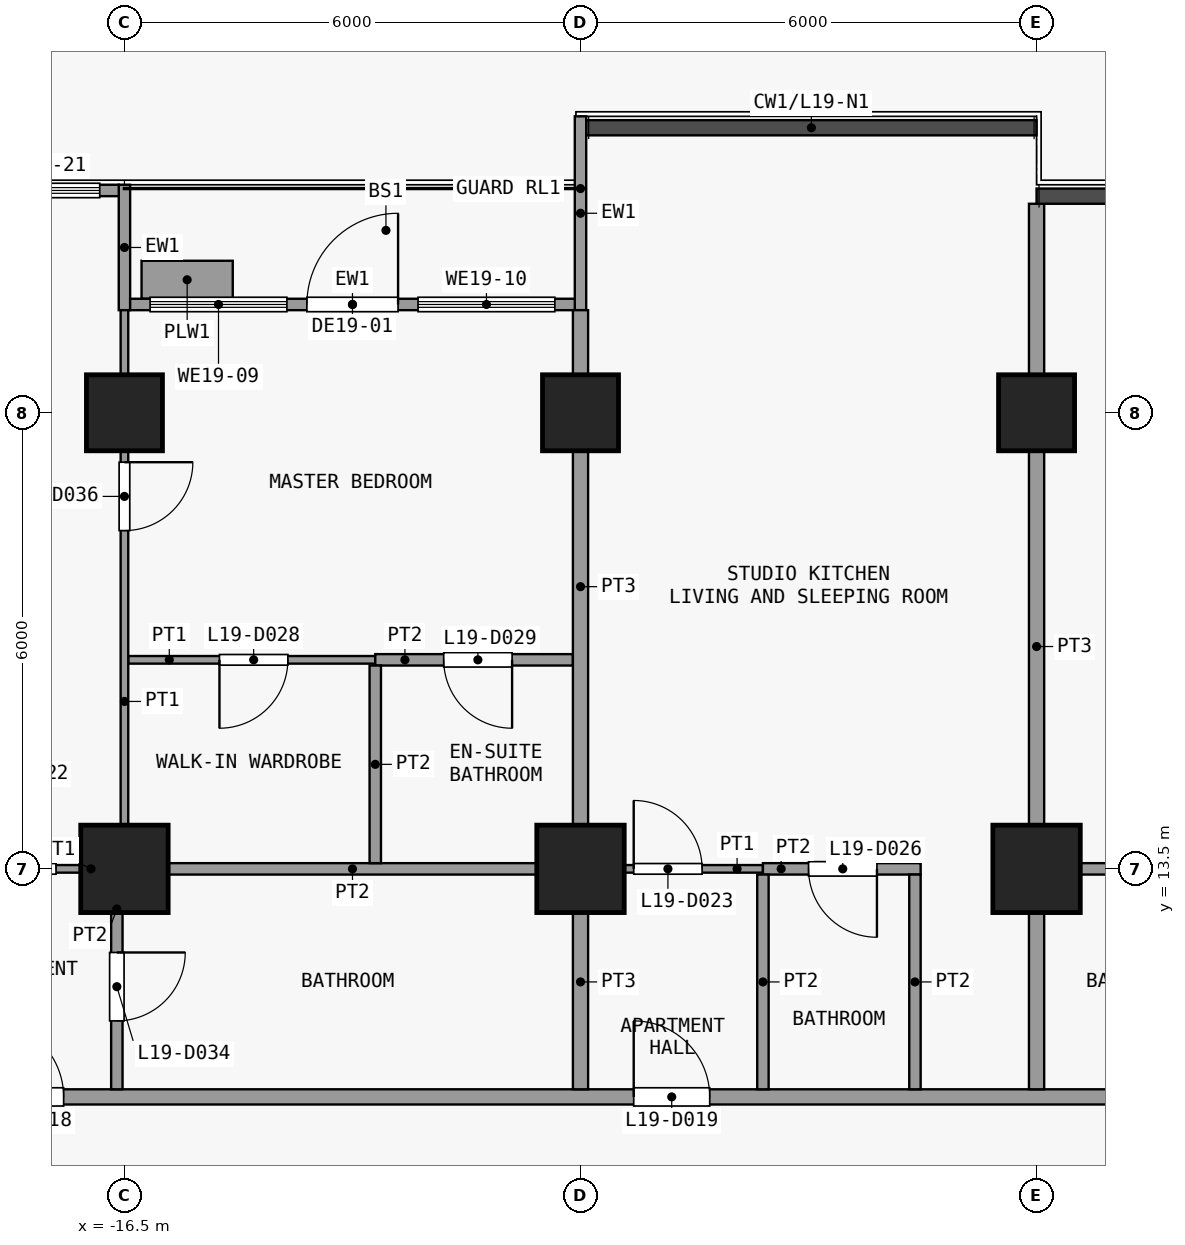
"""IFC4 building model, lengths in metres.
Left out: names, types, materials, properties, quantities, classifications, styles, units other than length and angle.
Written with IfcOpenShell. Run it as: python <this file> out.ifc"""

import sys

from ifc_helpers import new_model, si_unit, direction, frame, frame_2d, origin, origin_2d, place, context, subcontext, project, spatial, rectangle, extrude, element, fill, save


model = new_model("IFC4")
c1 = context("Model", 3, precision=1e-05, world=origin(), true_north=direction((0.0, 1.0)))
c2 = subcontext(c1, "Body", "Model", "MODEL_VIEW")
j1 = project(units=[si_unit("LENGTHUNIT", "METRE"), si_unit("PLANEANGLEUNIT", "RADIAN")], contexts=[c1])
p1 = place(None, origin())
s1 = spatial("IfcSite", under=j1, at=p1, CompositionType="ELEMENT")
p2 = place(p1, origin())
s2 = spatial("IfcBuilding", under=s1, at=p2, CompositionType="ELEMENT")
p3 = place(p2, frame((0.0, 0.0, 81.1)))
s3 = spatial("IfcBuildingStorey", under=s2, at=p3, CompositionType="ELEMENT", Elevation=81.1)
p4 = place(p3, frame((-16.5, 13.5, 0.0), z_axis=(0.0, 0.0, 1.0), x_axis=(1.0, 0.0, 0.0)))
e1 = element("IfcColumn", 1, at=p4, inside=s3, PredefinedType="COLUMN", context=c2, shape_type="SweptSolid", body=[
    extrude(rectangle(XDim=1.15, YDim=1.15, at=origin_2d()), origin(), (0.0, 0.0, 1.0), 3.6),
])
p5 = place(p3, frame((-16.5, 19.5, 0.0), z_axis=(0.0, 0.0, 1.0), x_axis=(1.0, 0.0, 0.0)))
e2 = element("IfcColumn", 2, at=p5, inside=s3, PredefinedType="COLUMN", context=c2, shape_type="SweptSolid", body=[
    extrude(rectangle(XDim=1.0, YDim=1.0, at=origin_2d()), origin(), (0.0, 0.0, 1.0), 3.6),
])
p6 = place(p3, frame((-10.5, 13.5, 0.0), z_axis=(0.0, 0.0, 1.0), x_axis=(1.0, 0.0, 0.0)))
e3 = element("IfcColumn", 3, at=p6, inside=s3, PredefinedType="COLUMN", context=c2, shape_type="SweptSolid", body=[
    extrude(rectangle(XDim=1.15, YDim=1.15, at=origin_2d()), origin(), (0.0, 0.0, 1.0), 3.6),
])
p7 = place(p3, frame((-10.5, 19.5, 0.0), z_axis=(0.0, 0.0, 1.0), x_axis=(1.0, 0.0, 0.0)))
e4 = element("IfcColumn", 4, at=p7, inside=s3, PredefinedType="COLUMN", context=c2, shape_type="SweptSolid", body=[
    extrude(rectangle(XDim=1.0, YDim=1.0, at=origin_2d()), origin(), (0.0, 0.0, 1.0), 3.6),
])
p8 = place(p3, frame((-4.5, 13.5, 0.0), z_axis=(0.0, 0.0, 1.0), x_axis=(1.0, 0.0, 0.0)))
e5 = element("IfcColumn", 5, at=p8, inside=s3, PredefinedType="COLUMN", context=c2, shape_type="SweptSolid", body=[
    extrude(rectangle(XDim=1.15, YDim=1.15, at=origin_2d()), origin(), (0.0, 0.0, 1.0), 3.6),
])
p9 = place(p3, frame((-4.5, 19.5, 0.0), z_axis=(0.0, 0.0, 1.0), x_axis=(1.0, 0.0, 0.0)))
e6 = element("IfcColumn", 6, at=p9, inside=s3, PredefinedType="COLUMN", context=c2, shape_type="SweptSolid", body=[
    extrude(rectangle(XDim=1.0, YDim=1.0, at=origin_2d()), origin(), (0.0, 0.0, 1.0), 3.6),
])
p10 = place(p3, frame((-16.5, 20.85, 0.0), z_axis=(0.0, 0.0, 1.0), x_axis=(0.0, 1.0, 0.0)))
e7 = element("IfcWall", 7, at=p10, inside=s3, PredefinedType="SOLIDWALL", context=c2, shape_type="SweptSolid", body=[
    extrude(rectangle(XDim=1.65, YDim=0.15, at=frame_2d((0.825, 0.0))), origin(), (0.0, 0.0, 1.0), 3.3),
])
p11 = place(p3, frame((-10.5, 20.85, 0.0), z_axis=(0.0, 0.0, 1.0), x_axis=(0.0, 1.0, 0.0)))
e8 = element("IfcWall", 8, at=p11, inside=s3, PredefinedType="SOLIDWALL", context=c2, shape_type="SweptSolid", body=[
    extrude(rectangle(XDim=2.55, YDim=0.15, at=frame_2d((1.275, 0.0))), origin(), (0.0, 0.0, 1.0), 3.3),
])
p12 = place(p3, frame((-16.425, 20.925, 0.0), z_axis=(0.0, 0.0, 1.0), x_axis=(1.0, 0.0, 0.0)))
e9 = element("IfcWall", 9, at=p12, inside=s3, PredefinedType="SOLIDWALL", context=c2, shape_type="SweptSolid", body=[
    extrude(rectangle(XDim=5.85, YDim=0.15, at=frame_2d((2.925, 0.0))), origin(), (0.0, 0.0, 1.0), 3.3),
])
p13 = place(p12, frame((2.325, 0.0, 0.0)))
e10 = element("IfcOpeningElement", 10, at=p13, cuts=e9, PredefinedType="OPENING", context=c2, shape_type="SweptSolid", body=[
    extrude(rectangle(XDim=1.2, YDim=2.4, at=frame_2d((0.6, 1.2))), frame((0.0, 0.085, 0.0), z_axis=(0.0, -1.0, 0.0), x_axis=(1.0, 0.0, 0.0)), (0.0, 0.0, 1.0), 0.17),
])
p14 = place(p12, frame((0.262, 0.0, 0.9)))
e11 = element("IfcOpeningElement", 11, at=p14, cuts=e9, PredefinedType="OPENING", context=c2, shape_type="SweptSolid", body=[
    extrude(rectangle(XDim=1.8, YDim=2.1, at=frame_2d((0.9, 1.05))), frame((0.0, 0.085, 0.0), z_axis=(0.0, -1.0, 0.0), x_axis=(1.0, 0.0, 0.0)), (0.0, 0.0, 1.0), 0.17),
])
p15 = place(p12, frame((3.788, 0.0, 0.9)))
e12 = element("IfcOpeningElement", 12, at=p15, cuts=e9, PredefinedType="OPENING", context=c2, shape_type="SweptSolid", body=[
    extrude(rectangle(XDim=1.8, YDim=2.1, at=frame_2d((0.9, 1.05))), frame((0.0, 0.085, 0.0), z_axis=(0.0, -1.0, 0.0), x_axis=(1.0, 0.0, 0.0)), (0.0, 0.0, 1.0), 0.17),
])
p16 = place(p3, frame((-16.275, 21.25, 0.0), z_axis=(0.0, 0.0, 1.0), x_axis=(1.0, 0.0, 0.0)))
e13 = element("IfcWall", 13, at=p16, inside=s3, PredefinedType="USERDEFINED", context=c2, shape_type="SweptSolid", body=[
    extrude(rectangle(XDim=1.2, YDim=0.5, at=frame_2d((0.6, 0.0))), origin(), (0.0, 0.0, 1.0), 0.9),
])
p17 = place(p3, frame((-22.0, 22.425, 0.0), z_axis=(0.0, 0.0, 1.0), x_axis=(1.0, 0.0, 0.0)))
e14 = element("IfcWall", 14, at=p17, inside=s3, PredefinedType="SOLIDWALL", context=c2, shape_type="SweptSolid", body=[
    extrude(rectangle(XDim=5.425, YDim=0.15, at=frame_2d((2.712, 0.0))), origin(), (0.0, 0.0, 1.0), 3.3),
])
p18 = place(p17, frame((2.0, 0.0, 0.0)))
e15 = element("IfcOpeningElement", 15, at=p18, cuts=e14, PredefinedType="OPENING", context=c2, shape_type="SweptSolid", body=[
    extrude(rectangle(XDim=1.5, YDim=2.4, at=frame_2d((0.75, 1.2))), frame((0.0, 0.085, 0.0), z_axis=(0.0, -1.0, 0.0), x_axis=(1.0, 0.0, 0.0)), (0.0, 0.0, 1.0), 0.17),
])
p19 = place(p17, frame((0.25, 0.0, 0.9)))
e16 = element("IfcOpeningElement", 16, at=p19, cuts=e14, PredefinedType="OPENING", context=c2, shape_type="SweptSolid", body=[
    extrude(rectangle(XDim=1.5, YDim=2.1, at=frame_2d((0.75, 1.05))), frame((0.0, 0.085, 0.0), z_axis=(0.0, -1.0, 0.0), x_axis=(1.0, 0.0, 0.0)), (0.0, 0.0, 1.0), 0.17),
])
p20 = place(p17, frame((3.75, 0.0, 0.9)))
e17 = element("IfcOpeningElement", 17, at=p20, cuts=e14, PredefinedType="OPENING", context=c2, shape_type="SweptSolid", body=[
    extrude(rectangle(XDim=1.425, YDim=2.1, at=frame_2d((0.712, 1.05))), frame((0.0, 0.085, 0.0), z_axis=(0.0, -1.0, 0.0), x_axis=(1.0, 0.0, 0.0)), (0.0, 0.0, 1.0), 0.17),
])
p21 = place(p3, frame((-23.85, 10.5, 0.0), z_axis=(0.0, 0.0, 1.0), x_axis=(1.0, 0.0, 0.0)))
e18 = element("IfcWall", 18, at=p21, inside=s3, PredefinedType="PARTITIONING", context=c2, shape_type="SweptSolid", body=[
    extrude(rectangle(XDim=49.2, YDim=0.2, at=frame_2d((24.6, 0.0))), origin(), (0.0, 0.0, 1.0), 3.3),
])
p22 = place(p21, frame((5.55, 0.0, 0.0)))
e19 = element("IfcOpeningElement", 19, at=p22, cuts=e18, PredefinedType="OPENING", context=c2, shape_type="SweptSolid", body=[
    extrude(rectangle(XDim=1.0, YDim=2.1, at=frame_2d((0.5, 1.05))), frame((0.0, 0.11, 0.0), z_axis=(0.0, -1.0, 0.0), x_axis=(1.0, 0.0, 0.0)), (0.0, 0.0, 1.0), 0.22),
])
p23 = place(p21, frame((14.05, 0.0, 0.0)))
e20 = element("IfcOpeningElement", 20, at=p23, cuts=e18, PredefinedType="OPENING", context=c2, shape_type="SweptSolid", body=[
    extrude(rectangle(XDim=1.0, YDim=2.1, at=frame_2d((0.5, 1.05))), frame((0.0, 0.11, 0.0), z_axis=(0.0, -1.0, 0.0), x_axis=(1.0, 0.0, 0.0)), (0.0, 0.0, 1.0), 0.22),
])
p24 = place(p21, frame((22.55, 0.0, 0.0)))
e21 = element("IfcOpeningElement", 21, at=p24, cuts=e18, PredefinedType="OPENING", context=c2, shape_type="SweptSolid", body=[
    extrude(rectangle(XDim=1.0, YDim=2.1, at=frame_2d((0.5, 1.05))), frame((0.0, 0.11, 0.0), z_axis=(0.0, -1.0, 0.0), x_axis=(1.0, 0.0, 0.0)), (0.0, 0.0, 1.0), 0.22),
])
p25 = place(p21, frame((43.55, 0.0, 0.0)))
e22 = element("IfcOpeningElement", 22, at=p25, cuts=e18, PredefinedType="OPENING", context=c2, shape_type="SweptSolid", body=[
    extrude(rectangle(XDim=1.0, YDim=2.1, at=frame_2d((0.5, 1.05))), frame((0.0, 0.11, 0.0), z_axis=(0.0, -1.0, 0.0), x_axis=(1.0, 0.0, 0.0)), (0.0, 0.0, 1.0), 0.22),
])
p26 = place(p3, frame((-19.0, 13.5, 0.0), z_axis=(0.0, 0.0, 1.0), x_axis=(1.0, 0.0, 0.0)))
e23 = element("IfcWall", 23, at=p26, inside=s3, PredefinedType="PARTITIONING", context=c2, shape_type="SweptSolid", body=[
    extrude(rectangle(XDim=2.4, YDim=0.1, at=frame_2d((1.2, 0.0))), origin(), (0.0, 0.0, 1.0), 3.3),
])
p27 = place(p26, frame((0.7, 0.0, 0.0)))
e24 = element("IfcOpeningElement", 24, at=p27, cuts=e23, PredefinedType="OPENING", context=c2, shape_type="SweptSolid", body=[
    extrude(rectangle(XDim=0.9, YDim=2.1, at=frame_2d((0.45, 1.05))), frame((0.0, 0.06, 0.0), z_axis=(0.0, -1.0, 0.0), x_axis=(1.0, 0.0, 0.0)), (0.0, 0.0, 1.0), 0.12),
])
p28 = place(p3, frame((-10.5, 13.5, 0.0), z_axis=(0.0, 0.0, 1.0), x_axis=(1.0, 0.0, 0.0)))
e25 = element("IfcWall", 25, at=p28, inside=s3, PredefinedType="PARTITIONING", context=c2, shape_type="SweptSolid", body=[
    extrude(rectangle(XDim=2.4, YDim=0.1, at=frame_2d((1.2, 0.0))), origin(), (0.0, 0.0, 1.0), 3.3),
])
p29 = place(p28, frame((0.7, 0.0, 0.0)))
e26 = element("IfcOpeningElement", 26, at=p29, cuts=e25, PredefinedType="OPENING", context=c2, shape_type="SweptSolid", body=[
    extrude(rectangle(XDim=0.9, YDim=2.1, at=frame_2d((0.45, 1.05))), frame((0.0, 0.06, 0.0), z_axis=(0.0, -1.0, 0.0), x_axis=(1.0, 0.0, 0.0)), (0.0, 0.0, 1.0), 0.12),
])
p30 = place(p3, frame((-16.5, 13.5, 0.0), z_axis=(0.0, 0.0, 1.0), x_axis=(1.0, 0.0, 0.0)))
e27 = element("IfcWall", 27, at=p30, inside=s3, PredefinedType="PARTITIONING", context=c2, shape_type="SweptSolid", body=[
    extrude(rectangle(XDim=6.0, YDim=0.15, at=frame_2d((3.0, 0.0))), origin(), (0.0, 0.0, 1.0), 3.3),
])
p31 = place(p3, frame((-8.1, 13.5, 0.0), z_axis=(0.0, 0.0, 1.0), x_axis=(1.0, 0.0, 0.0)))
e28 = element("IfcWall", 28, at=p31, inside=s3, PredefinedType="PARTITIONING", context=c2, shape_type="SweptSolid", body=[
    extrude(rectangle(XDim=2.075, YDim=0.15, at=frame_2d((1.038, 0.0))), origin(), (0.0, 0.0, 1.0), 3.3),
])
p32 = place(p31, frame((0.6, 0.0, 0.0)))
e29 = element("IfcOpeningElement", 29, at=p32, cuts=e28, PredefinedType="OPENING", context=c2, shape_type="SweptSolid", body=[
    extrude(rectangle(XDim=0.9, YDim=2.1, at=frame_2d((0.45, 1.05))), frame((0.0, 0.085, 0.0), z_axis=(0.0, -1.0, 0.0), x_axis=(1.0, 0.0, 0.0)), (0.0, 0.0, 1.0), 0.17),
])
p33 = place(p3, frame((-4.4, 13.5, 0.0), z_axis=(0.0, 0.0, 1.0), x_axis=(1.0, 0.0, 0.0)))
e30 = element("IfcWall", 30, at=p33, inside=s3, PredefinedType="PARTITIONING", context=c2, shape_type="SweptSolid", body=[
    extrude(rectangle(XDim=2.4, YDim=0.15, at=frame_2d((1.2, 0.0))), origin(), (0.0, 0.0, 1.0), 3.3),
])
p34 = place(p3, frame((-16.45, 16.25, 0.0), z_axis=(0.0, 0.0, 1.0), x_axis=(1.0, 0.0, 0.0)))
e31 = element("IfcWall", 31, at=p34, inside=s3, PredefinedType="PARTITIONING", context=c2, shape_type="SweptSolid", body=[
    extrude(rectangle(XDim=3.25, YDim=0.1, at=frame_2d((1.625, 0.0))), origin(), (0.0, 0.0, 1.0), 3.3),
])
p35 = place(p34, frame((1.2, 0.0, 0.0)))
e32 = element("IfcOpeningElement", 32, at=p35, cuts=e31, PredefinedType="OPENING", context=c2, shape_type="SweptSolid", body=[
    extrude(rectangle(XDim=0.9, YDim=2.1, at=frame_2d((0.45, 1.05))), frame((0.0, 0.06, 0.0), z_axis=(0.0, -1.0, 0.0), x_axis=(1.0, 0.0, 0.0)), (0.0, 0.0, 1.0), 0.12),
])
p36 = place(p3, frame((-13.2, 16.25, 0.0), z_axis=(0.0, 0.0, 1.0), x_axis=(1.0, 0.0, 0.0)))
e33 = element("IfcWall", 33, at=p36, inside=s3, PredefinedType="PARTITIONING", context=c2, shape_type="SweptSolid", body=[
    extrude(rectangle(XDim=2.6, YDim=0.15, at=frame_2d((1.3, 0.0))), origin(), (0.0, 0.0, 1.0), 3.3),
])
p37 = place(p36, frame((0.9, 0.0, 0.0)))
e34 = element("IfcOpeningElement", 34, at=p37, cuts=e33, PredefinedType="OPENING", context=c2, shape_type="SweptSolid", body=[
    extrude(rectangle(XDim=0.9, YDim=2.1, at=frame_2d((0.45, 1.05))), frame((0.0, 0.085, 0.0), z_axis=(0.0, -1.0, 0.0), x_axis=(1.0, 0.0, 0.0)), (0.0, 0.0, 1.0), 0.17),
])
p38 = place(p3, frame((-16.6, 10.6, 0.0), z_axis=(0.0, 0.0, 1.0), x_axis=(0.0, 1.0, 0.0)))
e35 = element("IfcWall", 35, at=p38, inside=s3, PredefinedType="PARTITIONING", context=c2, shape_type="SweptSolid", body=[
    extrude(rectangle(XDim=2.825, YDim=0.15, at=frame_2d((1.413, 0.0))), origin(), (0.0, 0.0, 1.0), 3.3),
])
p39 = place(p38, frame((0.9, 0.0, 0.0)))
e36 = element("IfcOpeningElement", 36, at=p39, cuts=e35, PredefinedType="OPENING", context=c2, shape_type="SweptSolid", body=[
    extrude(rectangle(XDim=0.9, YDim=2.1, at=frame_2d((0.45, 1.05))), frame((0.0, 0.085, 0.0), z_axis=(0.0, -1.0, 0.0), x_axis=(1.0, 0.0, 0.0)), (0.0, 0.0, 1.0), 0.17),
])
p40 = place(p3, frame((-16.5, 13.575, 0.0), z_axis=(0.0, 0.0, 1.0), x_axis=(0.0, 1.0, 0.0)))
e37 = element("IfcWall", 37, at=p40, inside=s3, PredefinedType="PARTITIONING", context=c2, shape_type="SweptSolid", body=[
    extrude(rectangle(XDim=7.275, YDim=0.1, at=frame_2d((3.638, 0.0))), origin(), (0.0, 0.0, 1.0), 3.3),
])
p41 = place(p40, frame((4.375, 0.0, 0.0)))
e38 = element("IfcOpeningElement", 38, at=p41, cuts=e37, PredefinedType="OPENING", context=c2, shape_type="SweptSolid", body=[
    extrude(rectangle(XDim=0.9, YDim=2.1, at=frame_2d((0.45, 1.05))), frame((0.0, 0.06, 0.0), z_axis=(0.0, -1.0, 0.0), x_axis=(1.0, 0.0, 0.0)), (0.0, 0.0, 1.0), 0.12),
])
p42 = place(p3, frame((-13.2, 13.575, 0.0), z_axis=(0.0, 0.0, 1.0), x_axis=(0.0, 1.0, 0.0)))
e39 = element("IfcWall", 39, at=p42, inside=s3, PredefinedType="PARTITIONING", context=c2, shape_type="SweptSolid", body=[
    extrude(rectangle(XDim=2.6, YDim=0.15, at=frame_2d((1.3, 0.0))), origin(), (0.0, 0.0, 1.0), 3.3),
])
p43 = place(p3, frame((-10.5, 10.6, 0.0), z_axis=(0.0, 0.0, 1.0), x_axis=(0.0, 1.0, 0.0)))
e40 = element("IfcWall", 40, at=p43, inside=s3, PredefinedType="PARTITIONING", context=c2, shape_type="SweptSolid", body=[
    extrude(rectangle(XDim=2.825, YDim=0.2, at=frame_2d((1.413, 0.0))), origin(), (0.0, 0.0, 1.0), 3.3),
])
p44 = place(p3, frame((-10.5, 13.575, 0.0), z_axis=(0.0, 0.0, 1.0), x_axis=(0.0, 1.0, 0.0)))
e41 = element("IfcWall", 41, at=p44, inside=s3, PredefinedType="PARTITIONING", context=c2, shape_type="SweptSolid", body=[
    extrude(rectangle(XDim=7.275, YDim=0.2, at=frame_2d((3.638, 0.0))), origin(), (0.0, 0.0, 1.0), 3.3),
])
for number, where, z_axis, x_axis in (
    (42, (-8.1, 10.6, 0.0), (0.0, 0.0, 1.0), (0.0, 1.0, 0.0)),
    (43, (-6.1, 10.6, 0.0), (0.0, 0.0, 1.0), (0.0, 1.0, 0.0)),
):
    element("IfcWall", number, at=place(p3, frame(where, z_axis=z_axis, x_axis=x_axis)), inside=s3, PredefinedType="PARTITIONING", context=c2, shape_type="SweptSolid", body=[
        extrude(rectangle(XDim=2.825, YDim=0.15, at=frame_2d((1.413, 0.0))), origin(), (0.0, 0.0, 1.0), 3.3),
    ])
p45 = place(p3, frame((-4.5, 10.6, 0.0), z_axis=(0.0, 0.0, 1.0), x_axis=(0.0, 1.0, 0.0)))
e44 = element("IfcWall", 44, at=p45, inside=s3, PredefinedType="PARTITIONING", context=c2, shape_type="SweptSolid", body=[
    extrude(rectangle(XDim=11.65, YDim=0.2, at=frame_2d((5.825, 0.0))), origin(), (0.0, 0.0, 1.0), 3.3),
])
p46 = place(p13, origin())
e45 = element("IfcDoor", 45, at=p46, inside=s3, OperationType="SINGLE_SWING_RIGHT", PredefinedType="DOOR", context=c2, shape_type="SweptSolid", body=[
    extrude(rectangle(XDim=1.2, YDim=2.4, at=frame_2d((0.6, 1.2))), frame((0.0, 0.025, 0.0), z_axis=(0.0, -1.0, 0.0), x_axis=(1.0, 0.0, 0.0)), (0.0, 0.0, 1.0), 0.05),
])
fill(e10, e45)
p47 = place(p14, origin())
e46 = element("IfcWindow", 46, at=p47, inside=s3, PartitioningType="SINGLE_PANEL", PredefinedType="WINDOW", context=c2, shape_type="SweptSolid", body=[
    extrude(rectangle(XDim=1.8, YDim=2.1, at=frame_2d((0.9, 1.05))), frame((0.0, 0.03, 0.0), z_axis=(0.0, -1.0, 0.0), x_axis=(1.0, 0.0, 0.0)), (0.0, 0.0, 1.0), 0.06),
])
fill(e11, e46)
p48 = place(p15, origin())
e47 = element("IfcWindow", 47, at=p48, inside=s3, PartitioningType="SINGLE_PANEL", PredefinedType="WINDOW", context=c2, shape_type="SweptSolid", body=[
    extrude(rectangle(XDim=1.8, YDim=2.1, at=frame_2d((0.9, 1.05))), frame((0.0, 0.03, 0.0), z_axis=(0.0, -1.0, 0.0), x_axis=(1.0, 0.0, 0.0)), (0.0, 0.0, 1.0), 0.06),
])
fill(e12, e47)
p49 = place(p20, origin())
e48 = element("IfcWindow", 48, at=p49, inside=s3, PartitioningType="SINGLE_PANEL", PredefinedType="WINDOW", context=c2, shape_type="SweptSolid", body=[
    extrude(rectangle(XDim=1.425, YDim=2.1, at=frame_2d((0.712, 1.05))), frame((0.0, 0.03, 0.0), z_axis=(0.0, -1.0, 0.0), x_axis=(1.0, 0.0, 0.0)), (0.0, 0.0, 1.0), 0.06),
])
fill(e17, e48)
p50 = place(p22, origin())
e49 = element("IfcDoor", 49, at=p50, inside=s3, OperationType="SINGLE_SWING_RIGHT", PredefinedType="DOOR", context=c2, shape_type="SweptSolid", body=[
    extrude(rectangle(XDim=1.0, YDim=2.1, at=frame_2d((0.5, 1.05))), frame((0.0, 0.025, 0.0), z_axis=(0.0, -1.0, 0.0), x_axis=(1.0, 0.0, 0.0)), (0.0, 0.0, 1.0), 0.05),
])
fill(e19, e49)
p51 = place(p23, origin())
e50 = element("IfcDoor", 50, at=p51, inside=s3, OperationType="SINGLE_SWING_RIGHT", PredefinedType="DOOR", context=c2, shape_type="SweptSolid", body=[
    extrude(rectangle(XDim=1.0, YDim=2.1, at=frame_2d((0.5, 1.05))), frame((0.0, 0.025, 0.0), z_axis=(0.0, -1.0, 0.0), x_axis=(1.0, 0.0, 0.0)), (0.0, 0.0, 1.0), 0.05),
])
fill(e20, e50)
p52 = place(p27, origin())
e51 = element("IfcDoor", 51, at=p52, inside=s3, OperationType="SINGLE_SWING_RIGHT", PredefinedType="DOOR", context=c2, shape_type="SweptSolid", body=[
    extrude(rectangle(XDim=0.9, YDim=2.1, at=frame_2d((0.45, 1.05))), frame((0.0, 0.025, 0.0), z_axis=(0.0, -1.0, 0.0), x_axis=(1.0, 0.0, 0.0)), (0.0, 0.0, 1.0), 0.05),
])
fill(e24, e51)
p53 = place(p29, origin())
e52 = element("IfcDoor", 52, at=p53, inside=s3, OperationType="SINGLE_SWING_RIGHT", PredefinedType="DOOR", context=c2, shape_type="SweptSolid", body=[
    extrude(rectangle(XDim=0.9, YDim=2.1, at=frame_2d((0.45, 1.05))), frame((0.0, 0.025, 0.0), z_axis=(0.0, -1.0, 0.0), x_axis=(1.0, 0.0, 0.0)), (0.0, 0.0, 1.0), 0.05),
])
fill(e26, e52)
p54 = place(p32, origin())
e53 = element("IfcDoor", 53, at=p54, inside=s3, OperationType="SINGLE_SWING_RIGHT", PredefinedType="DOOR", context=c2, shape_type="SweptSolid", body=[
    extrude(rectangle(XDim=0.9, YDim=2.1, at=frame_2d((0.45, 1.05))), frame((0.0, 0.025, 0.0), z_axis=(0.0, -1.0, 0.0), x_axis=(1.0, 0.0, 0.0)), (0.0, 0.0, 1.0), 0.05),
])
fill(e29, e53)
p55 = place(p35, origin())
e54 = element("IfcDoor", 54, at=p55, inside=s3, OperationType="SINGLE_SWING_LEFT", PredefinedType="DOOR", context=c2, shape_type="SweptSolid", body=[
    extrude(rectangle(XDim=0.9, YDim=2.1, at=frame_2d((0.45, 1.05))), frame((0.0, 0.025, 0.0), z_axis=(0.0, -1.0, 0.0), x_axis=(1.0, 0.0, 0.0)), (0.0, 0.0, 1.0), 0.05),
])
fill(e32, e54)
p56 = place(p37, origin())
e55 = element("IfcDoor", 55, at=p56, inside=s3, OperationType="SINGLE_SWING_RIGHT", PredefinedType="DOOR", context=c2, shape_type="SweptSolid", body=[
    extrude(rectangle(XDim=0.9, YDim=2.1, at=frame_2d((0.45, 1.05))), frame((0.0, 0.025, 0.0), z_axis=(0.0, -1.0, 0.0), x_axis=(1.0, 0.0, 0.0)), (0.0, 0.0, 1.0), 0.05),
])
fill(e34, e55)
p57 = place(p39, origin())
e56 = element("IfcDoor", 56, at=p57, inside=s3, OperationType="SINGLE_SWING_RIGHT", PredefinedType="DOOR", context=c2, shape_type="SweptSolid", body=[
    extrude(rectangle(XDim=0.9, YDim=2.1, at=frame_2d((0.45, 1.05))), frame((0.0, 0.025, 0.0), z_axis=(0.0, -1.0, 0.0), x_axis=(1.0, 0.0, 0.0)), (0.0, 0.0, 1.0), 0.05),
])
fill(e36, e56)
p58 = place(p41, origin())
e57 = element("IfcDoor", 57, at=p58, inside=s3, OperationType="SINGLE_SWING_RIGHT", PredefinedType="DOOR", context=c2, shape_type="SweptSolid", body=[
    extrude(rectangle(XDim=0.9, YDim=2.1, at=frame_2d((0.45, 1.05))), frame((0.0, 0.025, 0.0), z_axis=(0.0, -1.0, 0.0), x_axis=(1.0, 0.0, 0.0)), (0.0, 0.0, 1.0), 0.05),
])
fill(e38, e57)
save(model, sys.argv[1])
